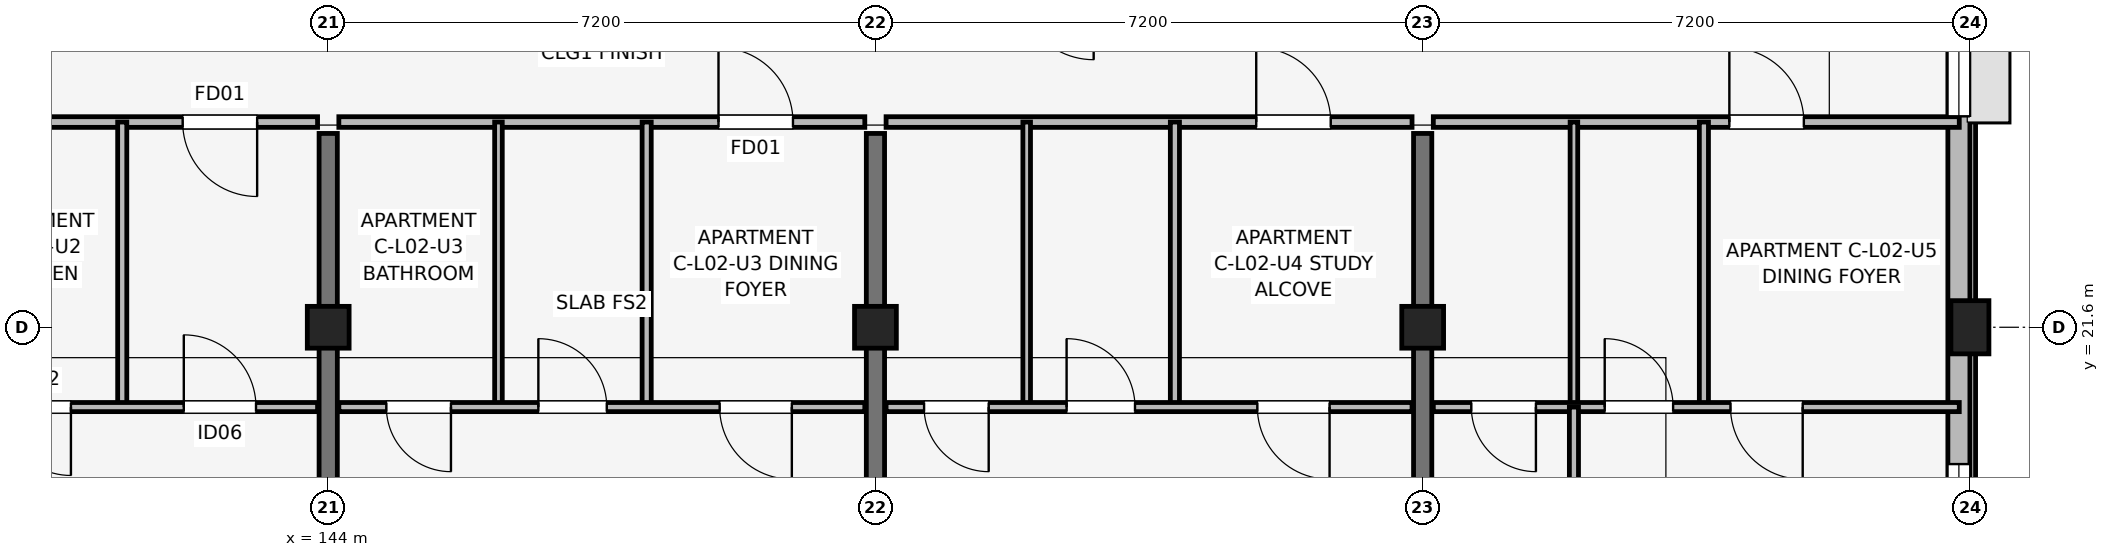
"""IFC4 building model, lengths in metres.
Left out: names, types, materials, properties, quantities, classifications, styles, units other than length and angle.
Written with IfcOpenShell. Run it as: python <this file> out.ifc"""

import sys

from ifc_helpers import new_model, si_unit, direction, frame, frame_2d, origin, origin_2d, place, context, subcontext, project, spatial, rectangle, extrude, element, fill, save


model = new_model("IFC4")
c1 = context("Model", 3, precision=1e-05, world=origin(), true_north=direction((0.0, 1.0)))
c2 = subcontext(c1, "Body", "Model", "MODEL_VIEW")
j1 = project(units=[si_unit("LENGTHUNIT", "METRE"), si_unit("PLANEANGLEUNIT", "RADIAN")], contexts=[c1])
p1 = place(None, origin())
s1 = spatial("IfcSite", under=j1, at=p1, CompositionType="ELEMENT")
p2 = place(p1, origin())
s2 = spatial("IfcBuilding", under=s1, at=p2, CompositionType="ELEMENT")
p3 = place(p2, frame((0.0, 0.0, 8.7)))
s3 = spatial("IfcBuildingStorey", under=s2, at=p3, CompositionType="ELEMENT", Elevation=8.7)
for number, where, z_axis, x_axis in (
    (1, (144.0, 21.6, 0.0), (0.0, 0.0, 1.0), (1.0, 0.0, 0.0)),
    (2, (151.2, 21.6, 0.0), (0.0, 0.0, 1.0), (1.0, 0.0, 0.0)),
    (3, (158.4, 21.6, 0.0), (0.0, 0.0, 1.0), (1.0, 0.0, 0.0)),
):
    element("IfcColumn", number, at=place(p3, frame(where, z_axis=z_axis, x_axis=x_axis)), inside=s3, PredefinedType="COLUMN", context=c2, shape_type="SweptSolid", body=[
        extrude(rectangle(XDim=0.55, YDim=0.55, at=origin_2d()), origin(), (0.0, 0.0, 1.0), 3.15),
    ])
p4 = place(p3, frame((165.6, 21.6, 0.0), z_axis=(0.0, 0.0, 1.0), x_axis=(1.0, 0.0, 0.0)))
e4 = element("IfcColumn", 4, at=p4, inside=s3, PredefinedType="COLUMN", context=c2, shape_type="SweptSolid", body=[
    extrude(rectangle(XDim=0.5, YDim=0.7, at=origin_2d()), origin(), (0.0, 0.0, 1.0), 3.15),
])
for number, where, z_axis, x_axis in (
    (5, (144.0, 14.75, 0.0), (0.0, 0.0, 1.0), (0.0, 1.0, 0.0)),
    (6, (151.2, 14.75, 0.0), (0.0, 0.0, 1.0), (0.0, 1.0, 0.0)),
    (7, (158.4, 14.75, 0.0), (0.0, 0.0, 1.0), (0.0, 1.0, 0.0)),
):
    element("IfcWall", number, at=place(p3, frame(where, z_axis=z_axis, x_axis=x_axis)), inside=s3, PredefinedType="SHEAR", context=c2, shape_type="SweptSolid", body=[
        extrude(rectangle(XDim=9.4, YDim=0.24, at=frame_2d((4.7, 0.0))), origin(), (0.0, 0.0, 1.0), 3.15),
    ])
p5 = place(p3, frame((165.455, 17.4, 0.0), z_axis=(0.0, 0.0, 1.0), x_axis=(0.0, 1.0, 0.0)))
e8 = element("IfcWall", 8, at=p5, inside=s3, PredefinedType="SOLIDWALL", context=c2, shape_type="SweptSolid", body=[
    extrude(rectangle(XDim=15.6, YDim=0.29, at=frame_2d((7.8, 0.0))), origin(), (0.0, 0.0, 1.0), 2.38),
])
p6 = place(p5, frame((6.975, 0.0, 1.05)))
e9 = element("IfcOpeningElement", 9, at=p6, cuts=e8, PredefinedType="OPENING", context=c2, shape_type="SweptSolid", body=[
    extrude(rectangle(XDim=1.65, YDim=1.15, at=frame_2d((0.825, 0.575))), frame((0.0, 0.155, 0.0), z_axis=(0.0, -1.0, 0.0), x_axis=(1.0, 0.0, 0.0)), (0.0, 0.0, 1.0), 0.31),
])
p7 = place(p5, frame((0.98, 0.0, 0.67)))
e10 = element("IfcOpeningElement", 10, at=p7, cuts=e8, PredefinedType="OPENING", context=c2, shape_type="SweptSolid", body=[
    extrude(rectangle(XDim=1.42, YDim=1.6, at=frame_2d((0.71, 0.8))), frame((0.0, 0.155, 0.0), z_axis=(0.0, -1.0, 0.0), x_axis=(1.0, 0.0, 0.0)), (0.0, 0.0, 1.0), 0.31),
])
p8 = place(p3, frame((136.94, 24.3, 0.0), z_axis=(0.0, 0.0, 1.0), x_axis=(1.0, 0.0, 0.0)))
e11 = element("IfcWall", 11, at=p8, inside=s3, PredefinedType="PARTITIONING", context=c2, shape_type="SweptSolid", body=[
    extrude(rectangle(XDim=6.92, YDim=0.14, at=frame_2d((3.46, 0.0))), origin(), (0.0, 0.0, 1.0), 2.38),
])
p9 = place(p8, frame((6.125, 0.0, 0.0), z_axis=(0.0, 0.0, 1.0), x_axis=(-1.0, 0.0, 0.0)))
e12 = element("IfcOpeningElement", 12, at=p9, cuts=e11, PredefinedType="OPENING", context=c2, shape_type="SweptSolid", body=[
    extrude(rectangle(XDim=0.98, YDim=2.1, at=frame_2d((0.49, 1.05))), frame((0.0, 0.08, 0.0), z_axis=(0.0, -1.0, 0.0), x_axis=(1.0, 0.0, 0.0)), (0.0, 0.0, 1.0), 0.16),
])
p10 = place(p3, frame((141.29, 20.55, 0.0), z_axis=(0.0, 0.0, 1.0), x_axis=(0.0, 1.0, 0.0)))
e13 = element("IfcWall", 13, at=p10, inside=s3, PredefinedType="PARTITIONING", context=c2, shape_type="SweptSolid", body=[
    extrude(rectangle(XDim=3.75, YDim=0.12, at=frame_2d((1.875, 0.0))), origin(), (0.0, 0.0, 1.0), 2.375),
])
p11 = place(p3, frame((136.94, 20.55, 0.0), z_axis=(0.0, 0.0, 1.0), x_axis=(1.0, 0.0, 0.0)))
e14 = element("IfcWall", 14, at=p11, inside=s3, PredefinedType="PARTITIONING", context=c2, shape_type="SweptSolid", body=[
    extrude(rectangle(XDim=6.92, YDim=0.12, at=frame_2d((3.46, 0.0))), origin(), (0.0, 0.0, 1.0), 2.38),
])
p12 = place(p11, frame((0.625, 0.0, 0.0)))
e15 = element("IfcOpeningElement", 15, at=p12, cuts=e14, PredefinedType="OPENING", context=c2, shape_type="SweptSolid", body=[
    extrude(rectangle(XDim=0.85, YDim=2.08, at=frame_2d((0.425, 1.04))), frame((0.0, 0.07, 0.0), z_axis=(0.0, -1.0, 0.0), x_axis=(1.0, 0.0, 0.0)), (0.0, 0.0, 1.0), 0.14),
])
p13 = place(p11, frame((3.675, 0.0, 0.0), z_axis=(0.0, 0.0, 1.0), x_axis=(-1.0, 0.0, 0.0)))
e16 = element("IfcOpeningElement", 16, at=p13, cuts=e14, PredefinedType="OPENING", context=c2, shape_type="SweptSolid", body=[
    extrude(rectangle(XDim=0.9, YDim=2.08, at=frame_2d((0.45, 1.04))), frame((0.0, 0.07, 0.0), z_axis=(0.0, -1.0, 0.0), x_axis=(1.0, 0.0, 0.0)), (0.0, 0.0, 1.0), 0.14),
])
p14 = place(p11, frame((5.16, 0.0, 0.0)))
e17 = element("IfcOpeningElement", 17, at=p14, cuts=e14, PredefinedType="OPENING", context=c2, shape_type="SweptSolid", body=[
    extrude(rectangle(XDim=0.95, YDim=2.08, at=frame_2d((0.475, 1.04))), frame((0.0, 0.07, 0.0), z_axis=(0.0, -1.0, 0.0), x_axis=(1.0, 0.0, 0.0)), (0.0, 0.0, 1.0), 0.14),
])
p15 = place(p3, frame((144.14, 24.3, 0.0), z_axis=(0.0, 0.0, 1.0), x_axis=(1.0, 0.0, 0.0)))
e18 = element("IfcWall", 18, at=p15, inside=s3, PredefinedType="PARTITIONING", context=c2, shape_type="SweptSolid", body=[
    extrude(rectangle(XDim=6.92, YDim=0.14, at=frame_2d((3.46, 0.0))), origin(), (0.0, 0.0, 1.0), 2.38),
])
p16 = place(p15, frame((4.995, 0.0, 0.0)))
e19 = element("IfcOpeningElement", 19, at=p16, cuts=e18, PredefinedType="OPENING", context=c2, shape_type="SweptSolid", body=[
    extrude(rectangle(XDim=0.98, YDim=2.1, at=frame_2d((0.49, 1.05))), frame((0.0, 0.08, 0.0), z_axis=(0.0, -1.0, 0.0), x_axis=(1.0, 0.0, 0.0)), (0.0, 0.0, 1.0), 0.16),
])
p17 = place(p3, frame((146.24, 20.55, 0.0), z_axis=(0.0, 0.0, 1.0), x_axis=(0.0, 1.0, 0.0)))
e20 = element("IfcWall", 20, at=p17, inside=s3, PredefinedType="PARTITIONING", context=c2, shape_type="SweptSolid", body=[
    extrude(rectangle(XDim=3.75, YDim=0.1, at=frame_2d((1.875, 0.0))), origin(), (0.0, 0.0, 1.0), 2.375),
])
p18 = place(p3, frame((148.19, 20.55, 0.0), z_axis=(0.0, 0.0, 1.0), x_axis=(0.0, 1.0, 0.0)))
e21 = element("IfcWall", 21, at=p18, inside=s3, PredefinedType="PARTITIONING", context=c2, shape_type="SweptSolid", body=[
    extrude(rectangle(XDim=3.75, YDim=0.12, at=frame_2d((1.875, 0.0))), origin(), (0.0, 0.0, 1.0), 2.375),
])
p19 = place(p3, frame((144.14, 20.55, 0.0), z_axis=(0.0, 0.0, 1.0), x_axis=(1.0, 0.0, 0.0)))
e22 = element("IfcWall", 22, at=p19, inside=s3, PredefinedType="PARTITIONING", context=c2, shape_type="SweptSolid", body=[
    extrude(rectangle(XDim=6.92, YDim=0.12, at=frame_2d((3.46, 0.0))), origin(), (0.0, 0.0, 1.0), 2.38),
])
p20 = place(p19, frame((1.475, 0.0, 0.0), z_axis=(0.0, 0.0, 1.0), x_axis=(-1.0, 0.0, 0.0)))
e23 = element("IfcOpeningElement", 23, at=p20, cuts=e22, PredefinedType="OPENING", context=c2, shape_type="SweptSolid", body=[
    extrude(rectangle(XDim=0.85, YDim=2.08, at=frame_2d((0.425, 1.04))), frame((0.0, 0.07, 0.0), z_axis=(0.0, -1.0, 0.0), x_axis=(1.0, 0.0, 0.0)), (0.0, 0.0, 1.0), 0.14),
])
p21 = place(p19, frame((2.625, 0.0, 0.0)))
e24 = element("IfcOpeningElement", 24, at=p21, cuts=e22, PredefinedType="OPENING", context=c2, shape_type="SweptSolid", body=[
    extrude(rectangle(XDim=0.9, YDim=2.08, at=frame_2d((0.45, 1.04))), frame((0.0, 0.07, 0.0), z_axis=(0.0, -1.0, 0.0), x_axis=(1.0, 0.0, 0.0)), (0.0, 0.0, 1.0), 0.14),
])
p22 = place(p19, frame((5.96, 0.0, 0.0), z_axis=(0.0, 0.0, 1.0), x_axis=(-1.0, 0.0, 0.0)))
e25 = element("IfcOpeningElement", 25, at=p22, cuts=e22, PredefinedType="OPENING", context=c2, shape_type="SweptSolid", body=[
    extrude(rectangle(XDim=0.95, YDim=2.08, at=frame_2d((0.475, 1.04))), frame((0.0, 0.07, 0.0), z_axis=(0.0, -1.0, 0.0), x_axis=(1.0, 0.0, 0.0)), (0.0, 0.0, 1.0), 0.14),
])
p23 = place(p3, frame((151.34, 24.3, 0.0), z_axis=(0.0, 0.0, 1.0), x_axis=(1.0, 0.0, 0.0)))
e26 = element("IfcWall", 26, at=p23, inside=s3, PredefinedType="PARTITIONING", context=c2, shape_type="SweptSolid", body=[
    extrude(rectangle(XDim=6.92, YDim=0.14, at=frame_2d((3.46, 0.0))), origin(), (0.0, 0.0, 1.0), 2.38),
])
p24 = place(p23, frame((4.87, 0.0, 0.0)))
e27 = element("IfcOpeningElement", 27, at=p24, cuts=e26, PredefinedType="OPENING", context=c2, shape_type="SweptSolid", body=[
    extrude(rectangle(XDim=0.98, YDim=2.1, at=frame_2d((0.49, 1.05))), frame((0.0, 0.08, 0.0), z_axis=(0.0, -1.0, 0.0), x_axis=(1.0, 0.0, 0.0)), (0.0, 0.0, 1.0), 0.16),
])
p25 = place(p3, frame((153.19, 20.55, 0.0), z_axis=(0.0, 0.0, 1.0), x_axis=(0.0, 1.0, 0.0)))
e28 = element("IfcWall", 28, at=p25, inside=s3, PredefinedType="PARTITIONING", context=c2, shape_type="SweptSolid", body=[
    extrude(rectangle(XDim=3.75, YDim=0.1, at=frame_2d((1.875, 0.0))), origin(), (0.0, 0.0, 1.0), 2.375),
])
p26 = place(p3, frame((155.14, 20.55, 0.0), z_axis=(0.0, 0.0, 1.0), x_axis=(0.0, 1.0, 0.0)))
e29 = element("IfcWall", 29, at=p26, inside=s3, PredefinedType="PARTITIONING", context=c2, shape_type="SweptSolid", body=[
    extrude(rectangle(XDim=3.75, YDim=0.12, at=frame_2d((1.875, 0.0))), origin(), (0.0, 0.0, 1.0), 2.375),
])
p27 = place(p3, frame((151.34, 20.55, 0.0), z_axis=(0.0, 0.0, 1.0), x_axis=(1.0, 0.0, 0.0)))
e30 = element("IfcWall", 30, at=p27, inside=s3, PredefinedType="PARTITIONING", context=c2, shape_type="SweptSolid", body=[
    extrude(rectangle(XDim=6.92, YDim=0.12, at=frame_2d((3.46, 0.0))), origin(), (0.0, 0.0, 1.0), 2.38),
])
p28 = place(p27, frame((1.35, 0.0, 0.0), z_axis=(0.0, 0.0, 1.0), x_axis=(-1.0, 0.0, 0.0)))
e31 = element("IfcOpeningElement", 31, at=p28, cuts=e30, PredefinedType="OPENING", context=c2, shape_type="SweptSolid", body=[
    extrude(rectangle(XDim=0.85, YDim=2.08, at=frame_2d((0.425, 1.04))), frame((0.0, 0.07, 0.0), z_axis=(0.0, -1.0, 0.0), x_axis=(1.0, 0.0, 0.0)), (0.0, 0.0, 1.0), 0.14),
])
p29 = place(p27, frame((2.375, 0.0, 0.0)))
e32 = element("IfcOpeningElement", 32, at=p29, cuts=e30, PredefinedType="OPENING", context=c2, shape_type="SweptSolid", body=[
    extrude(rectangle(XDim=0.9, YDim=2.08, at=frame_2d((0.45, 1.04))), frame((0.0, 0.07, 0.0), z_axis=(0.0, -1.0, 0.0), x_axis=(1.0, 0.0, 0.0)), (0.0, 0.0, 1.0), 0.14),
])
p30 = place(p27, frame((5.835, 0.0, 0.0), z_axis=(0.0, 0.0, 1.0), x_axis=(-1.0, 0.0, 0.0)))
e33 = element("IfcOpeningElement", 33, at=p30, cuts=e30, PredefinedType="OPENING", context=c2, shape_type="SweptSolid", body=[
    extrude(rectangle(XDim=0.95, YDim=2.08, at=frame_2d((0.475, 1.04))), frame((0.0, 0.07, 0.0), z_axis=(0.0, -1.0, 0.0), x_axis=(1.0, 0.0, 0.0)), (0.0, 0.0, 1.0), 0.14),
])
p31 = place(p3, frame((158.54, 24.3, 0.0), z_axis=(0.0, 0.0, 1.0), x_axis=(1.0, 0.0, 0.0)))
e34 = element("IfcWall", 34, at=p31, inside=s3, PredefinedType="PARTITIONING", context=c2, shape_type="SweptSolid", body=[
    extrude(rectangle(XDim=6.92, YDim=0.14, at=frame_2d((3.46, 0.0))), origin(), (0.0, 0.0, 1.0), 2.38),
])
p32 = place(p31, frame((3.895, 0.0, 0.0)))
e35 = element("IfcOpeningElement", 35, at=p32, cuts=e34, PredefinedType="OPENING", context=c2, shape_type="SweptSolid", body=[
    extrude(rectangle(XDim=0.98, YDim=2.1, at=frame_2d((0.49, 1.05))), frame((0.0, 0.08, 0.0), z_axis=(0.0, -1.0, 0.0), x_axis=(1.0, 0.0, 0.0)), (0.0, 0.0, 1.0), 0.16),
])
p33 = place(p3, frame((160.39, 20.55, 0.0), z_axis=(0.0, 0.0, 1.0), x_axis=(0.0, 1.0, 0.0)))
e36 = element("IfcWall", 36, at=p33, inside=s3, PredefinedType="PARTITIONING", context=c2, shape_type="SweptSolid", body=[
    extrude(rectangle(XDim=3.75, YDim=0.1, at=frame_2d((1.875, 0.0))), origin(), (0.0, 0.0, 1.0), 2.375),
])
p34 = place(p3, frame((162.1, 20.55, 0.0), z_axis=(0.0, 0.0, 1.0), x_axis=(0.0, 1.0, 0.0)))
e37 = element("IfcWall", 37, at=p34, inside=s3, PredefinedType="PARTITIONING", context=c2, shape_type="SweptSolid", body=[
    extrude(rectangle(XDim=3.75, YDim=0.12, at=frame_2d((1.875, 0.0))), origin(), (0.0, 0.0, 1.0), 2.375),
])
p35 = place(p3, frame((158.54, 20.55, 0.0), z_axis=(0.0, 0.0, 1.0), x_axis=(1.0, 0.0, 0.0)))
e38 = element("IfcWall", 38, at=p35, inside=s3, PredefinedType="PARTITIONING", context=c2, shape_type="SweptSolid", body=[
    extrude(rectangle(XDim=6.92, YDim=0.12, at=frame_2d((3.46, 0.0))), origin(), (0.0, 0.0, 1.0), 2.38),
])
p36 = place(p35, frame((1.35, 0.0, 0.0), z_axis=(0.0, 0.0, 1.0), x_axis=(-1.0, 0.0, 0.0)))
e39 = element("IfcOpeningElement", 39, at=p36, cuts=e38, PredefinedType="OPENING", context=c2, shape_type="SweptSolid", body=[
    extrude(rectangle(XDim=0.85, YDim=2.08, at=frame_2d((0.425, 1.04))), frame((0.0, 0.07, 0.0), z_axis=(0.0, -1.0, 0.0), x_axis=(1.0, 0.0, 0.0)), (0.0, 0.0, 1.0), 0.14),
])
p37 = place(p35, frame((2.255, 0.0, 0.0)))
e40 = element("IfcOpeningElement", 40, at=p37, cuts=e38, PredefinedType="OPENING", context=c2, shape_type="SweptSolid", body=[
    extrude(rectangle(XDim=0.9, YDim=2.08, at=frame_2d((0.45, 1.04))), frame((0.0, 0.07, 0.0), z_axis=(0.0, -1.0, 0.0), x_axis=(1.0, 0.0, 0.0)), (0.0, 0.0, 1.0), 0.14),
])
p38 = place(p35, frame((4.86, 0.0, 0.0), z_axis=(0.0, 0.0, 1.0), x_axis=(-1.0, 0.0, 0.0)))
e41 = element("IfcOpeningElement", 41, at=p38, cuts=e38, PredefinedType="OPENING", context=c2, shape_type="SweptSolid", body=[
    extrude(rectangle(XDim=0.95, YDim=2.08, at=frame_2d((0.475, 1.04))), frame((0.0, 0.07, 0.0), z_axis=(0.0, -1.0, 0.0), x_axis=(1.0, 0.0, 0.0)), (0.0, 0.0, 1.0), 0.14),
])
p39 = place(p3, frame((160.39, 14.7, 0.0), z_axis=(0.0, 0.0, 1.0), x_axis=(0.0, 1.0, 0.0)))
e42 = element("IfcWall", 42, at=p39, inside=s3, PredefinedType="PARTITIONING", context=c2, shape_type="SweptSolid", body=[
    extrude(rectangle(XDim=5.85, YDim=0.12, at=frame_2d((2.925, 0.0))), origin(), (0.0, 0.0, 1.0), 2.38),
])
p40 = place(p39, frame((2.475, 0.0, 0.0)))
e43 = element("IfcOpeningElement", 43, at=p40, cuts=e42, PredefinedType="OPENING", context=c2, shape_type="SweptSolid", body=[
    extrude(rectangle(XDim=0.9, YDim=2.08, at=frame_2d((0.45, 1.04))), frame((0.0, 0.07, 0.0), z_axis=(0.0, -1.0, 0.0), x_axis=(1.0, 0.0, 0.0)), (0.0, 0.0, 1.0), 0.14),
])
p41 = place(p6, origin())
e44 = element("IfcWindow", 44, at=p41, inside=s3, PartitioningType="SINGLE_PANEL", PredefinedType="WINDOW", context=c2, shape_type="SweptSolid", body=[
    extrude(rectangle(XDim=1.65, YDim=1.15, at=frame_2d((0.825, 0.575))), frame((0.0, 0.03, 0.0), z_axis=(0.0, -1.0, 0.0), x_axis=(1.0, 0.0, 0.0)), (0.0, 0.0, 1.0), 0.06),
])
fill(e9, e44)
p42 = place(p7, origin())
e45 = element("IfcWindow", 45, at=p42, inside=s3, PartitioningType="SINGLE_PANEL", PredefinedType="WINDOW", context=c2, shape_type="SweptSolid", body=[
    extrude(rectangle(XDim=1.42, YDim=1.6, at=frame_2d((0.71, 0.8))), frame((0.0, 0.03, 0.0), z_axis=(0.0, -1.0, 0.0), x_axis=(1.0, 0.0, 0.0)), (0.0, 0.0, 1.0), 0.06),
])
fill(e10, e45)
p43 = place(p9, origin())
e46 = element("IfcDoor", 46, at=p43, inside=s3, OperationType="SINGLE_SWING_RIGHT", PredefinedType="DOOR", context=c2, shape_type="SweptSolid", body=[
    extrude(rectangle(XDim=0.98, YDim=2.1, at=frame_2d((0.49, 1.05))), frame((0.0, 0.025, 0.0), z_axis=(0.0, -1.0, 0.0), x_axis=(1.0, 0.0, 0.0)), (0.0, 0.0, 1.0), 0.05),
])
fill(e12, e46)
p44 = place(p13, origin())
e47 = element("IfcDoor", 47, at=p44, inside=s3, OperationType="SINGLE_SWING_RIGHT", PredefinedType="DOOR", context=c2, shape_type="SweptSolid", body=[
    extrude(rectangle(XDim=0.9, YDim=2.08, at=frame_2d((0.45, 1.04))), frame((0.0, 0.025, 0.0), z_axis=(0.0, -1.0, 0.0), x_axis=(1.0, 0.0, 0.0)), (0.0, 0.0, 1.0), 0.05),
])
fill(e16, e47)
p45 = place(p14, origin())
e48 = element("IfcDoor", 48, at=p45, inside=s3, OperationType="SINGLE_SWING_LEFT", PredefinedType="DOOR", context=c2, shape_type="SweptSolid", body=[
    extrude(rectangle(XDim=0.95, YDim=2.08, at=frame_2d((0.475, 1.04))), frame((0.0, 0.025, 0.0), z_axis=(0.0, -1.0, 0.0), x_axis=(1.0, 0.0, 0.0)), (0.0, 0.0, 1.0), 0.05),
])
fill(e17, e48)
p46 = place(p16, origin())
e49 = element("IfcDoor", 49, at=p46, inside=s3, OperationType="SINGLE_SWING_LEFT", PredefinedType="DOOR", context=c2, shape_type="SweptSolid", body=[
    extrude(rectangle(XDim=0.98, YDim=2.1, at=frame_2d((0.49, 1.05))), frame((0.0, 0.025, 0.0), z_axis=(0.0, -1.0, 0.0), x_axis=(1.0, 0.0, 0.0)), (0.0, 0.0, 1.0), 0.05),
])
fill(e19, e49)
p47 = place(p20, origin())
e50 = element("IfcDoor", 50, at=p47, inside=s3, OperationType="SINGLE_SWING_RIGHT", PredefinedType="DOOR", context=c2, shape_type="SweptSolid", body=[
    extrude(rectangle(XDim=0.85, YDim=2.08, at=frame_2d((0.425, 1.04))), frame((0.0, 0.025, 0.0), z_axis=(0.0, -1.0, 0.0), x_axis=(1.0, 0.0, 0.0)), (0.0, 0.0, 1.0), 0.05),
])
fill(e23, e50)
p48 = place(p21, origin())
e51 = element("IfcDoor", 51, at=p48, inside=s3, OperationType="SINGLE_SWING_LEFT", PredefinedType="DOOR", context=c2, shape_type="SweptSolid", body=[
    extrude(rectangle(XDim=0.9, YDim=2.08, at=frame_2d((0.45, 1.04))), frame((0.0, 0.025, 0.0), z_axis=(0.0, -1.0, 0.0), x_axis=(1.0, 0.0, 0.0)), (0.0, 0.0, 1.0), 0.05),
])
fill(e24, e51)
p49 = place(p22, origin())
e52 = element("IfcDoor", 52, at=p49, inside=s3, OperationType="SINGLE_SWING_RIGHT", PredefinedType="DOOR", context=c2, shape_type="SweptSolid", body=[
    extrude(rectangle(XDim=0.95, YDim=2.08, at=frame_2d((0.475, 1.04))), frame((0.0, 0.025, 0.0), z_axis=(0.0, -1.0, 0.0), x_axis=(1.0, 0.0, 0.0)), (0.0, 0.0, 1.0), 0.05),
])
fill(e25, e52)
p50 = place(p24, origin())
e53 = element("IfcDoor", 53, at=p50, inside=s3, OperationType="SINGLE_SWING_LEFT", PredefinedType="DOOR", context=c2, shape_type="SweptSolid", body=[
    extrude(rectangle(XDim=0.98, YDim=2.1, at=frame_2d((0.49, 1.05))), frame((0.0, 0.025, 0.0), z_axis=(0.0, -1.0, 0.0), x_axis=(1.0, 0.0, 0.0)), (0.0, 0.0, 1.0), 0.05),
])
fill(e27, e53)
p51 = place(p28, origin())
e54 = element("IfcDoor", 54, at=p51, inside=s3, OperationType="SINGLE_SWING_RIGHT", PredefinedType="DOOR", context=c2, shape_type="SweptSolid", body=[
    extrude(rectangle(XDim=0.85, YDim=2.08, at=frame_2d((0.425, 1.04))), frame((0.0, 0.025, 0.0), z_axis=(0.0, -1.0, 0.0), x_axis=(1.0, 0.0, 0.0)), (0.0, 0.0, 1.0), 0.05),
])
fill(e31, e54)
p52 = place(p29, origin())
e55 = element("IfcDoor", 55, at=p52, inside=s3, OperationType="SINGLE_SWING_LEFT", PredefinedType="DOOR", context=c2, shape_type="SweptSolid", body=[
    extrude(rectangle(XDim=0.9, YDim=2.08, at=frame_2d((0.45, 1.04))), frame((0.0, 0.025, 0.0), z_axis=(0.0, -1.0, 0.0), x_axis=(1.0, 0.0, 0.0)), (0.0, 0.0, 1.0), 0.05),
])
fill(e32, e55)
p53 = place(p30, origin())
e56 = element("IfcDoor", 56, at=p53, inside=s3, OperationType="SINGLE_SWING_RIGHT", PredefinedType="DOOR", context=c2, shape_type="SweptSolid", body=[
    extrude(rectangle(XDim=0.95, YDim=2.08, at=frame_2d((0.475, 1.04))), frame((0.0, 0.025, 0.0), z_axis=(0.0, -1.0, 0.0), x_axis=(1.0, 0.0, 0.0)), (0.0, 0.0, 1.0), 0.05),
])
fill(e33, e56)
p54 = place(p32, origin())
e57 = element("IfcDoor", 57, at=p54, inside=s3, OperationType="SINGLE_SWING_LEFT", PredefinedType="DOOR", context=c2, shape_type="SweptSolid", body=[
    extrude(rectangle(XDim=0.98, YDim=2.1, at=frame_2d((0.49, 1.05))), frame((0.0, 0.025, 0.0), z_axis=(0.0, -1.0, 0.0), x_axis=(1.0, 0.0, 0.0)), (0.0, 0.0, 1.0), 0.05),
])
fill(e35, e57)
p55 = place(p36, origin())
e58 = element("IfcDoor", 58, at=p55, inside=s3, OperationType="SINGLE_SWING_RIGHT", PredefinedType="DOOR", context=c2, shape_type="SweptSolid", body=[
    extrude(rectangle(XDim=0.85, YDim=2.08, at=frame_2d((0.425, 1.04))), frame((0.0, 0.025, 0.0), z_axis=(0.0, -1.0, 0.0), x_axis=(1.0, 0.0, 0.0)), (0.0, 0.0, 1.0), 0.05),
])
fill(e39, e58)
p56 = place(p37, origin())
e59 = element("IfcDoor", 59, at=p56, inside=s3, OperationType="SINGLE_SWING_LEFT", PredefinedType="DOOR", context=c2, shape_type="SweptSolid", body=[
    extrude(rectangle(XDim=0.9, YDim=2.08, at=frame_2d((0.45, 1.04))), frame((0.0, 0.025, 0.0), z_axis=(0.0, -1.0, 0.0), x_axis=(1.0, 0.0, 0.0)), (0.0, 0.0, 1.0), 0.05),
])
fill(e40, e59)
p57 = place(p38, origin())
e60 = element("IfcDoor", 60, at=p57, inside=s3, OperationType="SINGLE_SWING_RIGHT", PredefinedType="DOOR", context=c2, shape_type="SweptSolid", body=[
    extrude(rectangle(XDim=0.95, YDim=2.08, at=frame_2d((0.475, 1.04))), frame((0.0, 0.025, 0.0), z_axis=(0.0, -1.0, 0.0), x_axis=(1.0, 0.0, 0.0)), (0.0, 0.0, 1.0), 0.05),
])
fill(e41, e60)
save(model, sys.argv[1])
